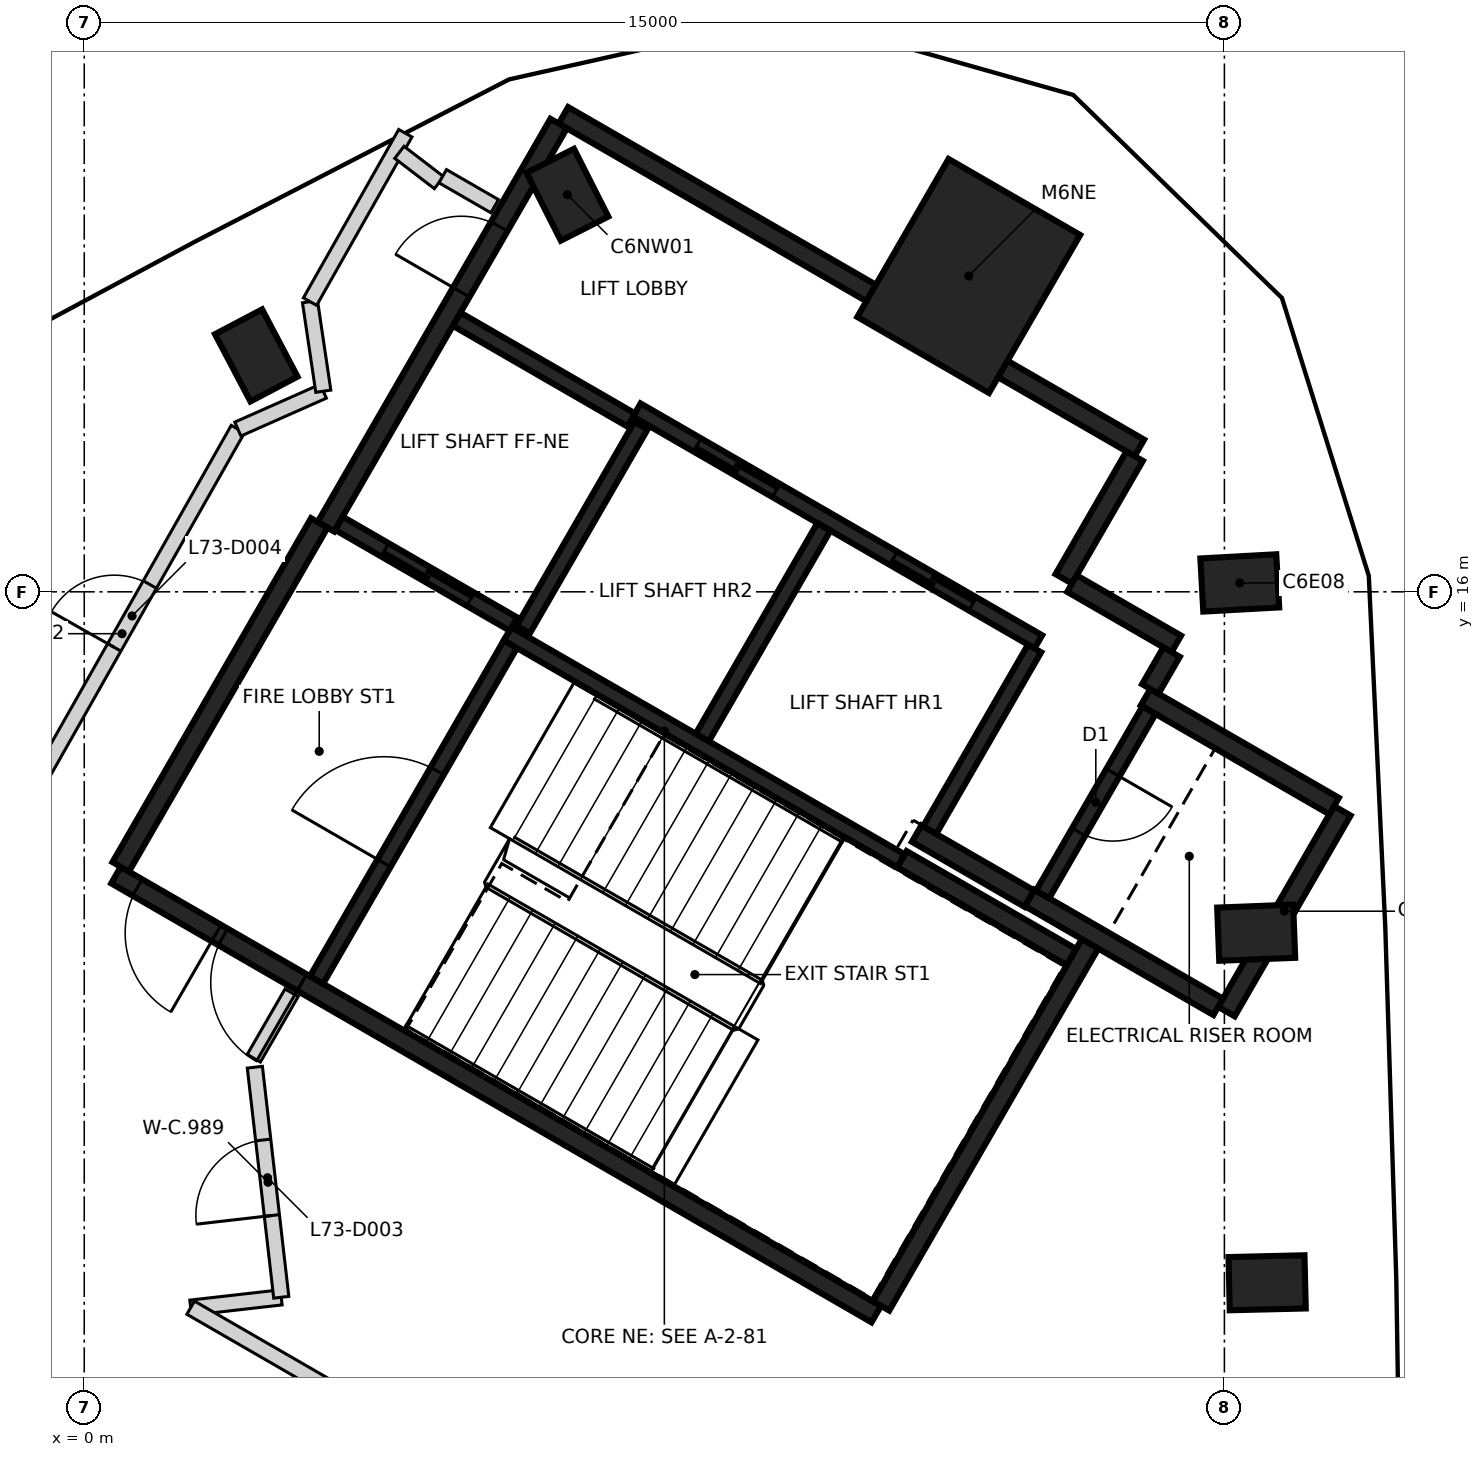
"""IFC4 building model, lengths in metres.
Left out: names, types, materials, properties, quantities, classifications, styles, units other than length and angle.
Written with IfcOpenShell. Run it as: python <this file> out.ifc"""

import sys

from ifc_helpers import new_model, si_unit, direction, frame, frame_2d, origin, origin_2d, place, context, subcontext, project, spatial, rectangle, extrude, element, fill, save


model = new_model("IFC4")
c1 = context("Model", 3, precision=1e-05, world=origin(), true_north=direction((0.0, 1.0)))
c2 = subcontext(c1, "Body", "Model", "MODEL_VIEW")
j1 = project(units=[si_unit("LENGTHUNIT", "METRE"), si_unit("PLANEANGLEUNIT", "RADIAN")], contexts=[c1])
p1 = place(None, origin())
s1 = spatial("IfcSite", under=j1, at=p1, CompositionType="ELEMENT")
p2 = place(p1, origin())
s2 = spatial("IfcBuilding", under=s1, at=p2, CompositionType="ELEMENT")
p3 = place(p2, frame((0.0, 0.0, 291.0)))
s3 = spatial("IfcBuildingStorey", under=s2, at=p3, CompositionType="ELEMENT", Elevation=291.0)
for number, where, z_axis, x_axis in (
    (1, (15.562, 6.91, -0.35), (0.0, 0.0, 1.0), (1.0, 0.024, 0.0)),
    (2, (15.418, 11.515, -0.35), (0.0, 0.0, 1.0), (0.999, 0.039, 0.0)),
    (3, (15.202, 16.117, -0.35), (0.0, 0.0, 1.0), (0.998, 0.055, 0.0)),
    (4, (6.356, 21.224, -0.35), (0.0, 0.0, 1.0), (-0.452, 0.892, 0.0)),
    (5, (2.263, 19.11, -0.35), (0.0, 0.0, 1.0), (-0.466, 0.885, 0.0)),
):
    element("IfcColumn", number, at=place(p3, frame(where, z_axis=z_axis, x_axis=x_axis)), inside=s3, PredefinedType="COLUMN", context=c2, shape_type="SweptSolid", body=[
        extrude(rectangle(XDim=1.0, YDim=0.7, at=origin_2d()), origin(), (0.0, 0.0, 1.0), 3.6),
    ])
p4 = place(p3, frame((11.637, 20.155, -0.35), z_axis=(0.0, 0.0, 1.0), x_axis=(0.5, 0.866025403784, 0.0)))
e6 = element("IfcColumn", 6, at=p4, inside=s3, PredefinedType="COLUMN", context=c2, shape_type="SweptSolid", body=[
    extrude(rectangle(XDim=2.4, YDim=2.0, at=origin_2d()), origin(), (0.0, 0.0, 1.0), 3.6),
])
p5 = place(p3, frame((10.42, 6.498, 0.0), z_axis=(0.0, 0.0, 1.0), x_axis=(-0.866021906294, 0.500006057782, 0.0)))
e7 = element("IfcWall", 7, at=p5, inside=s3, PredefinedType="SHEAR", context=c2, shape_type="SweptSolid", body=[
    extrude(rectangle(XDim=11.55, YDim=0.25, at=frame_2d((5.775, 0.0))), origin(), (0.0, 0.0, 1.0), 3.25),
])
p6 = place(p5, frame((10.025, 0.0, 0.0)))
e8 = element("IfcOpeningElement", 8, at=p6, cuts=e7, PredefinedType="OPENING", context=c2, shape_type="SweptSolid", body=[
    extrude(rectangle(XDim=1.2, YDim=2.1, at=frame_2d((0.6, 1.05))), frame((0.0, 0.135, 0.0), z_axis=(0.0, -1.0, 0.0), x_axis=(1.0, 0.0, 0.0)), (0.0, 0.0, 1.0), 0.27),
])
p7 = place(p5, frame((8.725, 0.0, 0.0)))
e9 = element("IfcOpeningElement", 9, at=p7, cuts=e7, PredefinedType="OPENING", context=c2, shape_type="SweptSolid", body=[
    extrude(rectangle(XDim=1.2, YDim=2.1, at=frame_2d((0.6, 1.05))), frame((0.0, 0.135, 0.0), z_axis=(0.0, -1.0, 0.0), x_axis=(1.0, 0.0, 0.0)), (0.0, 0.0, 1.0), 0.27),
])
p8 = place(p3, frame((6.304, 22.269, 0.0), z_axis=(0.0, 0.0, 1.0), x_axis=(0.866022959057, -0.500004234368, 0.0)))
e10 = element("IfcWall", 10, at=p8, inside=s3, PredefinedType="SHEAR", context=c2, shape_type="SweptSolid", body=[
    extrude(rectangle(XDim=8.75, YDim=0.25, at=frame_2d((4.375, 0.0))), origin(), (0.0, 0.0, 1.0), 3.25),
])
p9 = place(p3, frame((3.179, 16.856, 0.0), z_axis=(0.0, 0.0, 1.0), x_axis=(0.500001955336, 0.866024274868, 0.0)))
e11 = element("IfcWall", 11, at=p9, inside=s3, PredefinedType="SHEAR", context=c2, shape_type="SweptSolid", body=[
    extrude(rectangle(XDim=6.125, YDim=0.25, at=frame_2d((3.062, 0.0))), origin(), (0.0, 0.0, 1.0), 3.25),
])
p10 = place(p9, frame((3.563, 0.0, 0.0)))
e12 = element("IfcOpeningElement", 12, at=p10, cuts=e11, PredefinedType="OPENING", context=c2, shape_type="SweptSolid", body=[
    extrude(rectangle(XDim=1.0, YDim=2.1, at=frame_2d((0.5, 1.05))), frame((0.0, 0.135, 0.0), z_axis=(0.0, -1.0, 0.0), x_axis=(1.0, 0.0, 0.0)), (0.0, 0.0, 1.0), 0.27),
])
p11 = place(p3, frame((0.48, 12.381, 0.0), z_axis=(0.0, 0.0, 1.0), x_axis=(0.49999885962, 0.866026062182, 0.0)))
e13 = element("IfcWall", 13, at=p11, inside=s3, PredefinedType="SHEAR", context=c2, shape_type="SweptSolid", body=[
    extrude(rectangle(XDim=5.225, YDim=0.25, at=frame_2d((2.612, 0.0))), origin(), (0.0, 0.0, 1.0), 3.25),
])
p12 = place(p3, frame((13.238, 11.378, 0.0), z_axis=(0.0, 0.0, 1.0), x_axis=(-0.500008851346, -0.866020293397, 0.0)))
e14 = element("IfcWall", 14, at=p12, inside=s3, PredefinedType="SHEAR", context=c2, shape_type="SweptSolid", body=[
    extrude(rectangle(XDim=5.51, YDim=0.25, at=frame_2d((2.755, 0.0))), origin(), (0.0, 0.0, 1.0), 3.25),
])
p13 = place(p3, frame((16.552, 13.119, 0.0), z_axis=(0.0, 0.0, 1.0), x_axis=(-0.499978833458, -0.866037623948, 0.0)))
e15 = element("IfcWall", 15, at=p13, inside=s3, PredefinedType="SHEAR", context=c2, shape_type="SweptSolid", body=[
    extrude(rectangle(XDim=3.05, YDim=0.25, at=frame_2d((1.525, 0.0))), origin(), (0.0, 0.0, 1.0), 3.25),
])
p14 = place(p3, frame((14.918, 10.54, 0.0), z_axis=(0.0, 0.0, 1.0), x_axis=(-0.866063538972, 0.499933942099, 0.0)))
e16 = element("IfcWall", 16, at=p14, inside=s3, PredefinedType="SHEAR", context=c2, shape_type="SweptSolid", body=[
    extrude(rectangle(XDim=2.865, YDim=0.25, at=frame_2d((1.432, 0.0))), origin(), (0.0, 0.0, 1.0), 3.25),
])
p15 = place(p3, frame((13.963, 14.614, 0.0), z_axis=(0.0, 0.0, 1.0), x_axis=(0.866042235819, -0.499970844928, 0.0)))
e17 = element("IfcWall", 17, at=p15, inside=s3, PredefinedType="SHEAR", context=c2, shape_type="SweptSolid", body=[
    extrude(rectangle(XDim=2.865, YDim=0.25, at=frame_2d((1.432, 0.0))), origin(), (0.0, 0.0, 1.0), 3.25),
])
p16 = place(p3, frame((10.757, 12.481, 0.0), z_axis=(0.0, 0.0, 1.0), x_axis=(0.866022940537, -0.500004266446, 0.0)))
e18 = element("IfcWall", 18, at=p16, inside=s3, PredefinedType="SHEAR", context=c2, shape_type="SweptSolid", body=[
    extrude(rectangle(XDim=2.575, YDim=0.25, at=frame_2d((1.287, 0.0))), origin(), (0.0, 0.0, 1.0), 3.25),
])
p17 = place(p3, frame((13.819, 17.785, 0.0), z_axis=(0.0, 0.0, 1.0), x_axis=(-0.500039802285, -0.866002422705, 0.0)))
e19 = element("IfcWall", 19, at=p17, inside=s3, PredefinedType="SHEAR", context=c2, shape_type="SweptSolid", body=[
    extrude(rectangle(XDim=1.865, YDim=0.25, at=frame_2d((0.932, 0.0))), origin(), (0.0, 0.0, 1.0), 3.25),
])
p18 = place(p3, frame((12.433, 11.964, 0.0), z_axis=(0.0, 0.0, 1.0), x_axis=(-0.866038183914, 0.499977863513, 0.0)))
e20 = element("IfcWall", 20, at=p18, inside=s3, PredefinedType="SHEAR", context=c2, shape_type="SweptSolid", body=[
    extrude(rectangle(XDim=1.71, YDim=0.25, at=frame_2d((0.855, 0.0))), origin(), (0.0, 0.0, 1.0), 3.25),
])
p19 = place(p3, frame((12.995, 16.108, 0.0), z_axis=(0.0, 0.0, 1.0), x_axis=(0.866044474677, -0.49996696679, 0.0)))
e21 = element("IfcWall", 21, at=p19, inside=s3, PredefinedType="SHEAR", context=c2, shape_type="SweptSolid", body=[
    extrude(rectangle(XDim=1.584, YDim=0.25, at=frame_2d((0.792, 0.0))), origin(), (0.0, 0.0, 1.0), 3.25),
])
p20 = place(p3, frame((14.305, 15.207, 0.0), z_axis=(0.0, 0.0, 1.0), x_axis=(-0.499848422343, -0.866112899501, 0.0)))
e22 = element("IfcWall", 22, at=p20, inside=s3, PredefinedType="SHEAR", context=c2, shape_type="SweptSolid", body=[
    extrude(rectangle(XDim=0.559, YDim=0.25, at=frame_2d((0.28, 0.0))), origin(), (0.0, 0.0, 1.0), 3.25),
])
p21 = place(p3, frame((12.552, 15.342, 0.0), z_axis=(0.0, 0.0, 1.0), x_axis=(-0.866030299012, 0.499991521122, 0.0)))
e23 = element("IfcWall", 23, at=p21, inside=s3, PredefinedType="SHEAR", context=c2, shape_type="SweptSolid", body=[
    extrude(rectangle(XDim=6.1, YDim=0.2, at=frame_2d((3.05, 0.0))), origin(), (0.0, 0.0, 1.0), 3.25),
])
p22 = place(p21, frame((1.0, 0.0, 0.0)))
e24 = element("IfcOpeningElement", 24, at=p22, cuts=e23, PredefinedType="OPENING", context=c2, shape_type="SweptSolid", body=[
    extrude(rectangle(XDim=1.2, YDim=2.1, at=frame_2d((0.6, 1.05))), frame((0.0, 0.11, 0.0), z_axis=(0.0, -1.0, 0.0), x_axis=(1.0, 0.0, 0.0)), (0.0, 0.0, 1.0), 0.22),
])
p23 = place(p21, frame((3.982, 0.0, 0.0)))
e25 = element("IfcOpeningElement", 25, at=p23, cuts=e23, PredefinedType="OPENING", context=c2, shape_type="SweptSolid", body=[
    extrude(rectangle(XDim=1.2, YDim=2.1, at=frame_2d((0.6, 1.05))), frame((0.0, 0.11, 0.0), z_axis=(0.0, -1.0, 0.0), x_axis=(1.0, 0.0, 0.0)), (0.0, 0.0, 1.0), 0.22),
])
p24 = place(p3, frame((10.743, 12.46, 0.0), z_axis=(0.0, 0.0, 1.0), x_axis=(-0.866018848283, 0.500011354289, 0.0)))
e26 = element("IfcWall", 26, at=p24, inside=s3, PredefinedType="SHEAR", context=c2, shape_type="SweptSolid", body=[
    extrude(rectangle(XDim=5.974, YDim=0.2, at=frame_2d((2.987, 0.0))), origin(), (0.0, 0.0, 1.0), 3.25),
])
p25 = place(p3, frame((3.057, 10.895, 0.0), z_axis=(0.0, 0.0, 1.0), x_axis=(0.500027839223, 0.866009330205, 0.0)))
e27 = element("IfcWall", 27, at=p25, inside=s3, PredefinedType="SHEAR", context=c2, shape_type="SweptSolid", body=[
    extrude(rectangle(XDim=5.098, YDim=0.2, at=frame_2d((2.549, 0.0))), origin(), (0.0, 0.0, 1.0), 3.25),
])
p26 = place(p25, frame((1.774, 0.0, 0.0)))
e28 = element("IfcOpeningElement", 28, at=p26, cuts=e27, PredefinedType="OPENING", context=c2, shape_type="SweptSolid", body=[
    extrude(rectangle(XDim=1.4, YDim=2.1, at=frame_2d((0.7, 1.05))), frame((0.0, 0.11, 0.0), z_axis=(0.0, -1.0, 0.0), x_axis=(1.0, 0.0, 0.0)), (0.0, 0.0, 1.0), 0.22),
])
p27 = place(p3, frame((8.132, 14.084, 0.0), z_axis=(0.0, 0.0, 1.0), x_axis=(0.500030834389, 0.86600760081, 0.0)))
e29 = element("IfcWall", 29, at=p27, inside=s3, PredefinedType="SHEAR", context=c2, shape_type="SweptSolid", body=[
    extrude(rectangle(XDim=3.198, YDim=0.2, at=frame_2d((1.599, 0.0))), origin(), (0.0, 0.0, 1.0), 3.25),
])
p28 = place(p3, frame((14.008, 14.442, 0.0), z_axis=(0.0, 0.0, 1.0), x_axis=(-0.499986818241, -0.866033014143, 0.0)))
e30 = element("IfcWall", 30, at=p28, inside=s3, PredefinedType="SHEAR", context=c2, shape_type="SweptSolid", body=[
    extrude(rectangle(XDim=2.798, YDim=0.2, at=frame_2d((1.399, 0.0))), origin(), (0.0, 0.0, 1.0), 3.25),
])
p29 = place(p28, frame((0.949, 0.0, 0.0)))
e31 = element("IfcOpeningElement", 31, at=p29, cuts=e30, PredefinedType="OPENING", context=c2, shape_type="SweptSolid", body=[
    extrude(rectangle(XDim=0.9, YDim=2.1, at=frame_2d((0.45, 1.05))), frame((0.0, 0.11, 0.0), z_axis=(0.0, -1.0, 0.0), x_axis=(1.0, 0.0, 0.0)), (0.0, 0.0, 1.0), 0.22),
])
p30 = place(p3, frame((12.502, 15.255, 0.0), z_axis=(0.0, 0.0, 1.0), x_axis=(-0.499965018551, -0.866045599391, 0.0)))
e32 = element("IfcWall", 32, at=p30, inside=s3, PredefinedType="SHEAR", context=c2, shape_type="SweptSolid", body=[
    extrude(rectangle(XDim=2.759, YDim=0.2, at=frame_2d((1.379, 0.0))), origin(), (0.0, 0.0, 1.0), 3.25),
])
p31 = place(p3, frame((7.324, 18.187, 0.0), z_axis=(0.0, 0.0, 1.0), x_axis=(-0.499967891604, -0.866043940782, 0.0)))
e33 = element("IfcWall", 33, at=p31, inside=s3, PredefinedType="SHEAR", context=c2, shape_type="SweptSolid", body=[
    extrude(rectangle(XDim=3.1, YDim=0.2, at=frame_2d((1.55, 0.0))), origin(), (0.0, 0.0, 1.0), 3.25),
])
p32 = place(p3, frame((5.646, 15.576, 0.0), z_axis=(0.0, 0.0, 1.0), x_axis=(-0.866018407898, 0.500012117035, 0.0)))
e34 = element("IfcWall", 34, at=p32, inside=s3, PredefinedType="SHEAR", context=c2, shape_type="SweptSolid", body=[
    extrude(rectangle(XDim=2.651, YDim=0.2, at=frame_2d((1.325, 0.0))), origin(), (0.0, 0.0, 1.0), 3.25),
])
p33 = place(p32, frame((0.652, 0.0, 0.0)))
e35 = element("IfcOpeningElement", 35, at=p33, cuts=e34, PredefinedType="OPENING", context=c2, shape_type="SweptSolid", body=[
    extrude(rectangle(XDim=1.3, YDim=2.1, at=frame_2d((0.65, 1.05))), frame((0.0, 0.11, 0.0), z_axis=(0.0, -1.0, 0.0), x_axis=(1.0, 0.0, 0.0)), (0.0, 0.0, 1.0), 0.22),
])
p34 = place(p3, frame((7.196, 18.26, 0.0), z_axis=(0.0, 0.0, 1.0), x_axis=(-0.866018407898, 0.500012117035, 0.0)))
e36 = element("IfcWall", 36, at=p34, inside=s3, PredefinedType="SHEAR", context=c2, shape_type="SweptSolid", body=[
    extrude(rectangle(XDim=2.651, YDim=0.2, at=frame_2d((1.325, 0.0))), origin(), (0.0, 0.0, 1.0), 3.25),
])
p35 = place(p3, frame((-1.027, 12.757, 0.0), z_axis=(0.0, 0.0, 1.0), x_axis=(0.492663063759, 0.870220147783, 0.0)))
e37 = element("IfcWall", 37, at=p35, inside=s3, PredefinedType="PARTITIONING", context=c2, shape_type="SweptSolid", body=[
    extrude(rectangle(XDim=6.187, YDim=0.2, at=frame_2d((3.094, 0.0))), origin(), (0.0, 0.0, 1.0), 3.25),
])
p36 = place(p35, frame((2.887, 0.0, 0.0)))
e38 = element("IfcOpeningElement", 38, at=p36, cuts=e37, PredefinedType="OPENING", context=c2, shape_type="SweptSolid", body=[
    extrude(rectangle(XDim=0.95, YDim=2.1, at=frame_2d((0.475, 1.05))), frame((0.0, 0.11, 0.0), z_axis=(0.0, -1.0, 0.0), x_axis=(1.0, 0.0, 0.0)), (0.0, 0.0, 1.0), 0.22),
])
p37 = place(p3, frame((1.4, 6.582, 0.0), z_axis=(0.0, 0.0, 1.0), x_axis=(0.993556915844, 0.11333426216, 0.0)))
e39 = element("IfcWall", 39, at=p37, inside=s3, PredefinedType="PARTITIONING", context=c2, shape_type="SweptSolid", body=[
    extrude(rectangle(XDim=1.2, YDim=0.2, at=frame_2d((0.6, 0.0))), origin(), (0.0, 0.0, 1.0), 3.25),
])
p38 = place(p3, frame((1.4, 6.582, 0.0), z_axis=(0.0, 0.0, 1.0), x_axis=(0.866066271601, -0.499929208183, 0.0)))
e40 = element("IfcWall", 40, at=p38, inside=s3, PredefinedType="PARTITIONING", context=c2, shape_type="SweptSolid", body=[
    extrude(rectangle(XDim=2.078, YDim=0.2, at=frame_2d((1.039, 0.0))), origin(), (0.0, 0.0, 1.0), 3.25),
])
p39 = place(p3, frame((2.021, 18.141, 0.0), z_axis=(0.0, 0.0, 1.0), x_axis=(0.914343087003, 0.404940389748, 0.0)))
e41 = element("IfcWall", 41, at=p39, inside=s3, PredefinedType="PARTITIONING", context=c2, shape_type="SweptSolid", body=[
    extrude(rectangle(XDim=1.229, YDim=0.2, at=frame_2d((0.615, 0.0))), origin(), (0.0, 0.0, 1.0), 3.25),
])
p40 = place(p3, frame((2.592, 6.719, 0.0), z_axis=(0.0, 0.0, 1.0), x_axis=(-0.114027951455, 0.993477541914, 0.0)))
e42 = element("IfcWall", 42, at=p40, inside=s3, PredefinedType="PARTITIONING", context=c2, shape_type="SweptSolid", body=[
    extrude(rectangle(XDim=3.047, YDim=0.2, at=frame_2d((1.523, 0.0))), origin(), (0.0, 0.0, 1.0), 3.25),
])
p41 = place(p40, frame((1.083, 0.0, 0.0)))
e43 = element("IfcOpeningElement", 43, at=p41, cuts=e42, PredefinedType="OPENING", context=c2, shape_type="SweptSolid", body=[
    extrude(rectangle(XDim=1.0, YDim=2.1, at=frame_2d((0.5, 1.05))), frame((0.0, 0.11, 0.0), z_axis=(0.0, -1.0, 0.0), x_axis=(1.0, 0.0, 0.0)), (0.0, 0.0, 1.0), 0.22),
])
p42 = place(p3, frame((2.231, 9.864, 0.0), z_axis=(0.0, 0.0, 1.0), x_axis=(0.499942098031, 0.866058830921, 0.0)))
e44 = element("IfcWall", 44, at=p42, inside=s3, PredefinedType="PARTITIONING", context=c2, shape_type="SweptSolid", body=[
    extrude(rectangle(XDim=0.994, YDim=0.2, at=frame_2d((0.497, 0.0))), origin(), (0.0, 0.0, 1.0), 3.25),
])
p43 = place(p3, frame((2.97, 19.817, 0.0), z_axis=(0.0, 0.0, 1.0), x_axis=(0.146986994932, -0.989138424752, 0.0)))
e45 = element("IfcWall", 45, at=p43, inside=s3, PredefinedType="PARTITIONING", context=c2, shape_type="SweptSolid", body=[
    extrude(rectangle(XDim=1.191, YDim=0.2, at=frame_2d((0.595, 0.0))), origin(), (0.0, 0.0, 1.0), 2.35),
])
p44 = place(p3, frame((2.97, 19.818, 0.0), z_axis=(0.0, 0.0, 1.0), x_axis=(0.492727027301, 0.870183932607, 0.0)))
e46 = element("IfcWall", 46, at=p44, inside=s3, PredefinedType="PARTITIONING", context=c2, shape_type="SweptSolid", body=[
    extrude(rectangle(XDim=2.546, YDim=0.2, at=frame_2d((1.273, 0.0))), origin(), (0.0, 0.0, 1.0), 3.25),
])
p45 = place(p3, frame((4.146, 21.782, 0.0), z_axis=(0.0, 0.0, 1.0), x_axis=(0.793977493121, -0.607947152652, 0.0)))
e47 = element("IfcWall", 47, at=p45, inside=s3, PredefinedType="PARTITIONING", context=c2, shape_type="SweptSolid", body=[
    extrude(rectangle(XDim=0.656, YDim=0.2, at=frame_2d((0.328, 0.0))), origin(), (0.0, 0.0, 1.0), 3.25),
])
p46 = place(p3, frame((4.716, 21.468, 0.0), z_axis=(0.0, 0.0, 1.0), x_axis=(0.865912682783, -0.500195187698, 0.0)))
e48 = element("IfcWall", 48, at=p46, inside=s3, PredefinedType="PARTITIONING", context=c2, shape_type="SweptSolid", body=[
    extrude(rectangle(XDim=0.79, YDim=0.2, at=frame_2d((0.395, 0.0))), origin(), (0.0, 0.0, 1.0), 3.25),
])
p47 = place(p33, origin())
e49 = element("IfcDoor", 49, at=p47, inside=s3, OperationType="SLIDING_TO_LEFT", PredefinedType="DOOR", context=c2, shape_type="SweptSolid", body=[
    extrude(rectangle(XDim=1.3, YDim=2.1, at=frame_2d((0.65, 1.05))), frame((0.0, 0.025, 0.0), z_axis=(0.0, -1.0, 0.0), x_axis=(1.0, 0.0, 0.0)), (0.0, 0.0, 1.0), 0.05),
])
fill(e35, e49)
p48 = place(p22, origin())
e50 = element("IfcDoor", 50, at=p48, inside=s3, OperationType="DOUBLE_DOOR_SLIDING", PredefinedType="DOOR", context=c2, shape_type="SweptSolid", body=[
    extrude(rectangle(XDim=1.2, YDim=2.1, at=frame_2d((0.6, 1.05))), frame((0.0, 0.025, 0.0), z_axis=(0.0, -1.0, 0.0), x_axis=(1.0, 0.0, 0.0)), (0.0, 0.0, 1.0), 0.05),
])
fill(e24, e50)
p49 = place(p23, origin())
e51 = element("IfcDoor", 51, at=p49, inside=s3, OperationType="DOUBLE_DOOR_SLIDING", PredefinedType="DOOR", context=c2, shape_type="SweptSolid", body=[
    extrude(rectangle(XDim=1.2, YDim=2.1, at=frame_2d((0.6, 1.05))), frame((0.0, 0.025, 0.0), z_axis=(0.0, -1.0, 0.0), x_axis=(1.0, 0.0, 0.0)), (0.0, 0.0, 1.0), 0.05),
])
fill(e25, e51)
p50 = place(p10, origin())
e52 = element("IfcDoor", 52, at=p50, inside=s3, OperationType="SINGLE_SWING_LEFT", PredefinedType="DOOR", context=c2, shape_type="SweptSolid", body=[
    extrude(rectangle(XDim=1.0, YDim=2.1, at=frame_2d((0.5, 1.05))), frame((0.0, 0.025, 0.0), z_axis=(0.0, -1.0, 0.0), x_axis=(1.0, 0.0, 0.0)), (0.0, 0.0, 1.0), 0.05),
])
fill(e12, e52)
p51 = place(p6, origin())
e53 = element("IfcDoor", 53, at=p51, inside=s3, OperationType="SINGLE_SWING_LEFT", PredefinedType="DOOR", context=c2, shape_type="SweptSolid", body=[
    extrude(rectangle(XDim=1.2, YDim=2.1, at=frame_2d((0.6, 1.05))), frame((0.0, 0.025, 0.0), z_axis=(0.0, -1.0, 0.0), x_axis=(1.0, 0.0, 0.0)), (0.0, 0.0, 1.0), 0.05),
])
fill(e8, e53)
p52 = place(p7, origin())
e54 = element("IfcDoor", 54, at=p52, inside=s3, OperationType="SINGLE_SWING_RIGHT", PredefinedType="DOOR", context=c2, shape_type="SweptSolid", body=[
    extrude(rectangle(XDim=1.2, YDim=2.1, at=frame_2d((0.6, 1.05))), frame((0.0, 0.025, 0.0), z_axis=(0.0, -1.0, 0.0), x_axis=(1.0, 0.0, 0.0)), (0.0, 0.0, 1.0), 0.05),
])
fill(e9, e54)
p53 = place(p26, origin())
e55 = element("IfcDoor", 55, at=p53, inside=s3, OperationType="SINGLE_SWING_LEFT", PredefinedType="DOOR", context=c2, shape_type="SweptSolid", body=[
    extrude(rectangle(XDim=1.4, YDim=2.1, at=frame_2d((0.7, 1.05))), frame((0.0, 0.025, 0.0), z_axis=(0.0, -1.0, 0.0), x_axis=(1.0, 0.0, 0.0)), (0.0, 0.0, 1.0), 0.05),
])
fill(e28, e55)
p54 = place(p29, origin())
e56 = element("IfcDoor", 56, at=p54, inside=s3, OperationType="SINGLE_SWING_RIGHT", PredefinedType="DOOR", context=c2, shape_type="SweptSolid", body=[
    extrude(rectangle(XDim=0.9, YDim=2.1, at=frame_2d((0.45, 1.05))), frame((0.0, 0.025, 0.0), z_axis=(0.0, -1.0, 0.0), x_axis=(1.0, 0.0, 0.0)), (0.0, 0.0, 1.0), 0.05),
])
fill(e31, e56)
p55 = place(p41, origin())
e57 = element("IfcDoor", 57, at=p55, inside=s3, OperationType="SINGLE_SWING_LEFT", PredefinedType="DOOR", context=c2, shape_type="SweptSolid", body=[
    extrude(rectangle(XDim=1.0, YDim=2.1, at=frame_2d((0.5, 1.05))), frame((0.0, 0.025, 0.0), z_axis=(0.0, -1.0, 0.0), x_axis=(1.0, 0.0, 0.0)), (0.0, 0.0, 1.0), 0.05),
])
fill(e43, e57)
p56 = place(p36, origin())
e58 = element("IfcDoor", 58, at=p56, inside=s3, OperationType="SINGLE_SWING_LEFT", PredefinedType="DOOR", context=c2, shape_type="SweptSolid", body=[
    extrude(rectangle(XDim=0.95, YDim=2.1, at=frame_2d((0.475, 1.05))), frame((0.0, 0.025, 0.0), z_axis=(0.0, -1.0, 0.0), x_axis=(1.0, 0.0, 0.0)), (0.0, 0.0, 1.0), 0.05),
])
fill(e38, e58)
save(model, sys.argv[1])
